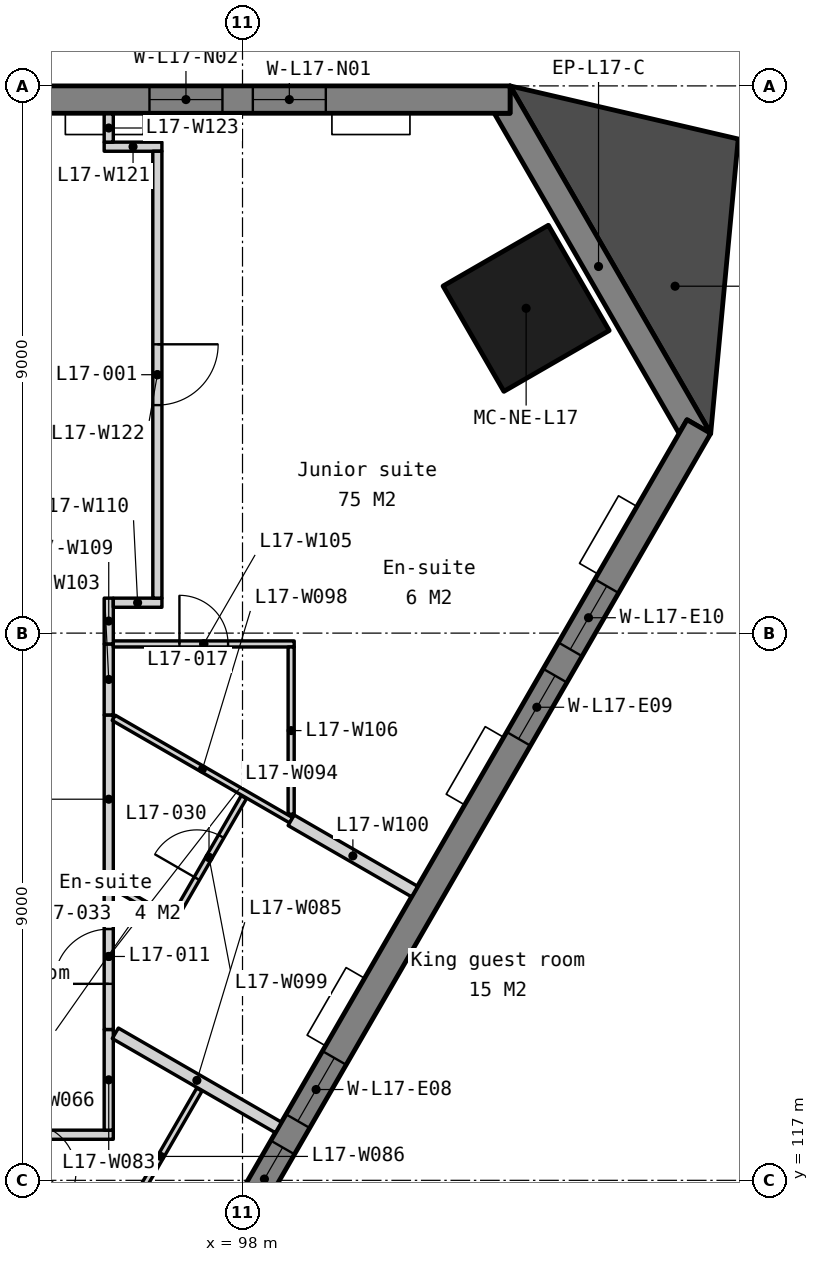
"""IFC4 building model, lengths in metres.
Left out: names, types, materials, properties, quantities, classifications, styles, units other than length and angle.
Written with IfcOpenShell. Run it as: python <this file> out.ifc"""

import sys

from ifc_helpers import new_model, si_unit, direction, frame, frame_2d, origin, origin_2d, place, context, subcontext, project, spatial, polyline, rectangle, outline, extrude, element, fill, save


model = new_model("IFC4")
c1 = context("Model", 3, precision=1e-05, world=origin(), true_north=direction((0.0, 1.0)))
c2 = subcontext(c1, "Body", "Model", "MODEL_VIEW")
j1 = project(units=[si_unit("LENGTHUNIT", "METRE"), si_unit("PLANEANGLEUNIT", "RADIAN")], contexts=[c1])
p1 = place(None, origin())
s1 = spatial("IfcSite", under=j1, at=p1, CompositionType="ELEMENT")
p2 = place(p1, origin())
s2 = spatial("IfcBuilding", under=s1, at=p2, CompositionType="ELEMENT")
p3 = place(p2, frame((0.0, 0.0, 73.5)))
s3 = spatial("IfcBuildingStorey", under=s2, at=p3, CompositionType="ELEMENT", Elevation=73.5)
p4 = place(p3, frame((102.664, 131.342, 0.0), z_axis=(0.0, 0.0, 1.0), x_axis=(-0.5, 0.866025403784, 0.0)))
e1 = element("IfcColumn", 1, at=p4, inside=s3, PredefinedType="COLUMN", context=c2, shape_type="SweptSolid", body=[
    extrude(rectangle(XDim=2.0, YDim=2.0, at=origin_2d()), origin(), (0.0, 0.0, 1.0), 3.5),
])
p5 = place(p3, frame((0.0, 0.0, -0.15)))
e2 = element("IfcWall", 2, at=p5, inside=s3, PredefinedType="SOLIDWALL", context=c2, shape_type="SweptSolid", body=[
    extrude(outline(polyline([(105.7, 129.284), (105.31, 129.509), (105.18, 129.284), (102.14, 134.55), (102.4, 134.55), (102.4, 135.0), (105.7, 129.284)])), origin(), (0.0, 0.0, 1.0), 3.4),
])
p6 = place(p3, frame((102.4, 134.775, -0.15), z_axis=(0.0, 0.0, 1.0), x_axis=(-1.0, 0.0, 0.0)))
e3 = element("IfcWall", 3, at=p6, inside=s3, PredefinedType="SOLIDWALL", context=c2, shape_type="SweptSolid", body=[
    extrude(outline(polyline([(44.8, 0.0), (44.8, 3.4), (0.0, 3.4), (0.0, 0.0), (44.8, 0.0)])), frame((0.0, 0.225, 0.0), z_axis=(0.0, -1.0, 0.0), x_axis=(1.0, 0.0, 0.0)), (0.0, 0.0, 1.0), 0.45),
])
p7 = place(p6, frame((3.03, 0.0, 1.05)))
e4 = element("IfcOpeningElement", 4, at=p7, cuts=e3, PredefinedType="OPENING", context=c2, shape_type="SweptSolid", body=[
    extrude(rectangle(XDim=1.2, YDim=1.5, at=frame_2d((0.6, 0.75))), frame((0.0, 0.235, 0.0), z_axis=(0.0, -1.0, 0.0), x_axis=(1.0, 0.0, 0.0)), (0.0, 0.0, 1.0), 0.47),
])
p8 = place(p6, frame((4.73, 0.0, 1.05)))
e5 = element("IfcOpeningElement", 5, at=p8, cuts=e3, PredefinedType="OPENING", context=c2, shape_type="SweptSolid", body=[
    extrude(rectangle(XDim=1.2, YDim=1.5, at=frame_2d((0.6, 0.75))), frame((0.0, 0.235, 0.0), z_axis=(0.0, -1.0, 0.0), x_axis=(1.0, 0.0, 0.0)), (0.0, 0.0, 1.0), 0.47),
])
p9 = place(p6, frame((11.99, 0.0, 1.05)))
e6 = element("IfcOpeningElement", 6, at=p9, cuts=e3, PredefinedType="OPENING", context=c2, shape_type="SweptSolid", body=[
    extrude(rectangle(XDim=1.2, YDim=1.5, at=frame_2d((0.6, 0.75))), frame((0.0, 0.235, 0.0), z_axis=(0.0, -1.0, 0.0), x_axis=(1.0, 0.0, 0.0)), (0.0, 0.0, 1.0), 0.47),
])
p10 = place(p6, frame((13.69, 0.0, 1.05)))
e7 = element("IfcOpeningElement", 7, at=p10, cuts=e3, PredefinedType="OPENING", context=c2, shape_type="SweptSolid", body=[
    extrude(rectangle(XDim=1.2, YDim=1.5, at=frame_2d((0.6, 0.75))), frame((0.0, 0.235, 0.0), z_axis=(0.0, -1.0, 0.0), x_axis=(1.0, 0.0, 0.0)), (0.0, 0.0, 1.0), 0.47),
])
p11 = place(p6, frame((20.95, 0.0, 1.05)))
e8 = element("IfcOpeningElement", 8, at=p11, cuts=e3, PredefinedType="OPENING", context=c2, shape_type="SweptSolid", body=[
    extrude(rectangle(XDim=1.2, YDim=1.5, at=frame_2d((0.6, 0.75))), frame((0.0, 0.235, 0.0), z_axis=(0.0, -1.0, 0.0), x_axis=(1.0, 0.0, 0.0)), (0.0, 0.0, 1.0), 0.47),
])
p12 = place(p6, frame((22.65, 0.0, 1.05)))
e9 = element("IfcOpeningElement", 9, at=p12, cuts=e3, PredefinedType="OPENING", context=c2, shape_type="SweptSolid", body=[
    extrude(rectangle(XDim=1.2, YDim=1.5, at=frame_2d((0.6, 0.75))), frame((0.0, 0.235, 0.0), z_axis=(0.0, -1.0, 0.0), x_axis=(1.0, 0.0, 0.0)), (0.0, 0.0, 1.0), 0.47),
])
p13 = place(p6, frame((29.91, 0.0, 1.05)))
e10 = element("IfcOpeningElement", 10, at=p13, cuts=e3, PredefinedType="OPENING", context=c2, shape_type="SweptSolid", body=[
    extrude(rectangle(XDim=1.2, YDim=1.5, at=frame_2d((0.6, 0.75))), frame((0.0, 0.235, 0.0), z_axis=(0.0, -1.0, 0.0), x_axis=(1.0, 0.0, 0.0)), (0.0, 0.0, 1.0), 0.47),
])
p14 = place(p6, frame((31.61, 0.0, 1.05)))
e11 = element("IfcOpeningElement", 11, at=p14, cuts=e3, PredefinedType="OPENING", context=c2, shape_type="SweptSolid", body=[
    extrude(rectangle(XDim=1.2, YDim=1.5, at=frame_2d((0.6, 0.75))), frame((0.0, 0.235, 0.0), z_axis=(0.0, -1.0, 0.0), x_axis=(1.0, 0.0, 0.0)), (0.0, 0.0, 1.0), 0.47),
])
p15 = place(p6, frame((38.87, 0.0, 1.05)))
e12 = element("IfcOpeningElement", 12, at=p15, cuts=e3, PredefinedType="OPENING", context=c2, shape_type="SweptSolid", body=[
    extrude(rectangle(XDim=1.2, YDim=1.5, at=frame_2d((0.6, 0.75))), frame((0.0, 0.235, 0.0), z_axis=(0.0, -1.0, 0.0), x_axis=(1.0, 0.0, 0.0)), (0.0, 0.0, 1.0), 0.47),
])
p16 = place(p6, frame((40.57, 0.0, 1.05)))
e13 = element("IfcOpeningElement", 13, at=p16, cuts=e3, PredefinedType="OPENING", context=c2, shape_type="SweptSolid", body=[
    extrude(rectangle(XDim=1.2, YDim=1.5, at=frame_2d((0.6, 0.75))), frame((0.0, 0.235, 0.0), z_axis=(0.0, -1.0, 0.0), x_axis=(1.0, 0.0, 0.0)), (0.0, 0.0, 1.0), 0.47),
])
p17 = place(p3, frame((83.105, 90.599, -0.15), z_axis=(0.0, 0.0, 1.0), x_axis=(0.499999201451, 0.866025864826, 0.0)))
e14 = element("IfcWall", 14, at=p17, inside=s3, PredefinedType="SOLIDWALL", context=c2, shape_type="SweptSolid", body=[
    extrude(outline(polyline([(44.8, 0.0), (44.8, 3.4), (0.0, 3.4), (0.0, 0.0), (44.8, 0.0)])), frame((0.0, 0.225, 0.0), z_axis=(0.0, -1.0, 0.0), x_axis=(1.0, 0.0, 0.0)), (0.0, 0.0, 1.0), 0.45),
])
p18 = place(p17, frame((3.03, 0.0, 1.05)))
e15 = element("IfcOpeningElement", 15, at=p18, cuts=e14, PredefinedType="OPENING", context=c2, shape_type="SweptSolid", body=[
    extrude(rectangle(XDim=1.2, YDim=1.5, at=frame_2d((0.6, 0.75))), frame((0.0, 0.235, 0.0), z_axis=(0.0, -1.0, 0.0), x_axis=(1.0, 0.0, 0.0)), (0.0, 0.0, 1.0), 0.47),
])
p19 = place(p17, frame((4.73, 0.0, 1.05)))
e16 = element("IfcOpeningElement", 16, at=p19, cuts=e14, PredefinedType="OPENING", context=c2, shape_type="SweptSolid", body=[
    extrude(rectangle(XDim=1.2, YDim=1.5, at=frame_2d((0.6, 0.75))), frame((0.0, 0.235, 0.0), z_axis=(0.0, -1.0, 0.0), x_axis=(1.0, 0.0, 0.0)), (0.0, 0.0, 1.0), 0.47),
])
p20 = place(p17, frame((11.99, 0.0, 1.05)))
e17 = element("IfcOpeningElement", 17, at=p20, cuts=e14, PredefinedType="OPENING", context=c2, shape_type="SweptSolid", body=[
    extrude(rectangle(XDim=1.2, YDim=1.5, at=frame_2d((0.6, 0.75))), frame((0.0, 0.235, 0.0), z_axis=(0.0, -1.0, 0.0), x_axis=(1.0, 0.0, 0.0)), (0.0, 0.0, 1.0), 0.47),
])
p21 = place(p17, frame((13.69, 0.0, 1.05)))
e18 = element("IfcOpeningElement", 18, at=p21, cuts=e14, PredefinedType="OPENING", context=c2, shape_type="SweptSolid", body=[
    extrude(rectangle(XDim=1.2, YDim=1.5, at=frame_2d((0.6, 0.75))), frame((0.0, 0.235, 0.0), z_axis=(0.0, -1.0, 0.0), x_axis=(1.0, 0.0, 0.0)), (0.0, 0.0, 1.0), 0.47),
])
p22 = place(p17, frame((20.95, 0.0, 1.05)))
e19 = element("IfcOpeningElement", 19, at=p22, cuts=e14, PredefinedType="OPENING", context=c2, shape_type="SweptSolid", body=[
    extrude(rectangle(XDim=1.2, YDim=1.5, at=frame_2d((0.6, 0.75))), frame((0.0, 0.235, 0.0), z_axis=(0.0, -1.0, 0.0), x_axis=(1.0, 0.0, 0.0)), (0.0, 0.0, 1.0), 0.47),
])
p23 = place(p17, frame((22.65, 0.0, 1.05)))
e20 = element("IfcOpeningElement", 20, at=p23, cuts=e14, PredefinedType="OPENING", context=c2, shape_type="SweptSolid", body=[
    extrude(rectangle(XDim=1.2, YDim=1.5, at=frame_2d((0.6, 0.75))), frame((0.0, 0.235, 0.0), z_axis=(0.0, -1.0, 0.0), x_axis=(1.0, 0.0, 0.0)), (0.0, 0.0, 1.0), 0.47),
])
p24 = place(p17, frame((29.91, 0.0, 1.05)))
e21 = element("IfcOpeningElement", 21, at=p24, cuts=e14, PredefinedType="OPENING", context=c2, shape_type="SweptSolid", body=[
    extrude(rectangle(XDim=1.2, YDim=1.5, at=frame_2d((0.6, 0.75))), frame((0.0, 0.235, 0.0), z_axis=(0.0, -1.0, 0.0), x_axis=(1.0, 0.0, 0.0)), (0.0, 0.0, 1.0), 0.47),
])
p25 = place(p17, frame((31.61, 0.0, 1.05)))
e22 = element("IfcOpeningElement", 22, at=p25, cuts=e14, PredefinedType="OPENING", context=c2, shape_type="SweptSolid", body=[
    extrude(rectangle(XDim=1.2, YDim=1.5, at=frame_2d((0.6, 0.75))), frame((0.0, 0.235, 0.0), z_axis=(0.0, -1.0, 0.0), x_axis=(1.0, 0.0, 0.0)), (0.0, 0.0, 1.0), 0.47),
])
p26 = place(p17, frame((38.87, 0.0, 1.05)))
e23 = element("IfcOpeningElement", 23, at=p26, cuts=e14, PredefinedType="OPENING", context=c2, shape_type="SweptSolid", body=[
    extrude(rectangle(XDim=1.2, YDim=1.5, at=frame_2d((0.6, 0.75))), frame((0.0, 0.235, 0.0), z_axis=(0.0, -1.0, 0.0), x_axis=(1.0, 0.0, 0.0)), (0.0, 0.0, 1.0), 0.47),
])
p27 = place(p17, frame((40.57, 0.0, 1.05)))
e24 = element("IfcOpeningElement", 24, at=p27, cuts=e14, PredefinedType="OPENING", context=c2, shape_type="SweptSolid", body=[
    extrude(rectangle(XDim=1.2, YDim=1.5, at=frame_2d((0.6, 0.75))), frame((0.0, 0.235, 0.0), z_axis=(0.0, -1.0, 0.0), x_axis=(1.0, 0.0, 0.0)), (0.0, 0.0, 1.0), 0.47),
])
p28 = place(p3, frame((0.0, 0.0, -0.15)))
e25 = element("IfcWall", 25, at=p28, inside=s3, PredefinedType="SOLIDWALL", context=c2, shape_type="SweptSolid", body=[
    extrude(outline(polyline([(105.7, 129.284), (106.152, 134.127), (102.4, 135.0), (105.7, 129.284)])), origin(), (0.0, 0.0, 1.0), 3.4),
])
p29 = place(p3, frame((93.575, 117.647, 0.0), z_axis=(0.0, 0.0, 1.0), x_axis=(0.866048401274, -0.499960165064, 0.0)))
e26 = element("IfcWall", 26, at=p29, inside=s3, PredefinedType="PARTITIONING", context=c2, shape_type="SweptSolid", body=[
    extrude(rectangle(XDim=2.845, YDim=0.1, at=frame_2d((1.422, 0.0))), origin(), (0.0, 0.0, 1.0), 3.25),
])
p30 = place(p29, frame((1.022, 0.0, 0.0)))
e27 = element("IfcOpeningElement", 27, at=p30, cuts=e26, PredefinedType="OPENING", context=c2, shape_type="SweptSolid", body=[
    extrude(rectangle(XDim=0.8, YDim=2.1, at=frame_2d((0.4, 1.05))), frame((0.0, 0.06, 0.0), z_axis=(0.0, -1.0, 0.0), x_axis=(1.0, 0.0, 0.0)), (0.0, 0.0, 1.0), 0.12),
])
p31 = place(p3, frame((93.398, 117.75, 0.0), z_axis=(0.0, 0.0, 1.0), x_axis=(1.0, 0.0, 0.0)))
e28 = element("IfcWall", 28, at=p31, inside=s3, PredefinedType="PARTITIONING", context=c2, shape_type="SweptSolid", body=[
    extrude(rectangle(XDim=2.477, YDim=0.15, at=frame_2d((1.239, 0.0))), origin(), (0.0, 0.0, 1.0), 3.25),
])
p32 = place(p3, frame((95.8, 117.825, 0.0), z_axis=(0.0, 0.0, 1.0), x_axis=(0.0, 1.0, 0.0)))
e29 = element("IfcWall", 29, at=p32, inside=s3, PredefinedType="PARTITIONING", context=c2, shape_type="SweptSolid", body=[
    extrude(rectangle(XDim=1.656, YDim=0.15, at=frame_2d((0.828, 0.0))), origin(), (0.0, 0.0, 1.0), 3.25),
])
p33 = place(p3, frame((95.908, 119.418, 0.0), z_axis=(0.0, 0.0, 1.0), x_axis=(0.866051688794, -0.499954470265, 0.0)))
e30 = element("IfcWall", 30, at=p33, inside=s3, PredefinedType="PARTITIONING", context=c2, shape_type="SweptSolid", body=[
    extrude(rectangle(XDim=3.097, YDim=0.2, at=frame_2d((1.548, 0.0))), origin(), (0.0, 0.0, 1.0), 3.25),
])
p34 = place(p3, frame((96.021, 116.293, 0.0), z_axis=(0.0, 0.0, 1.0), x_axis=(0.500005339912, 0.866022320763, 0.0)))
e31 = element("IfcWall", 31, at=p34, inside=s3, PredefinedType="PARTITIONING", context=c2, shape_type="SweptSolid", body=[
    extrude(rectangle(XDim=2.54, YDim=0.1, at=frame_2d((1.27, 0.0))), origin(), (0.0, 0.0, 1.0), 3.25),
])
p35 = place(p3, frame((95.882, 121.835, 0.0), z_axis=(0.0, 0.0, 1.0), x_axis=(0.86601174498, -0.500023656998, 0.0)))
e32 = element("IfcWall", 32, at=p35, inside=s3, PredefinedType="PARTITIONING", context=c2, shape_type="SweptSolid", body=[
    extrude(rectangle(XDim=1.169, YDim=0.1, at=frame_2d((0.585, 0.0))), origin(), (0.0, 0.0, 1.0), 3.25),
])
p36 = place(p3, frame((95.8, 121.883, 0.0), z_axis=(0.0, 0.0, 1.0), x_axis=(0.0, 1.0, 0.0)))
e33 = element("IfcWall", 33, at=p36, inside=s3, PredefinedType="PARTITIONING", context=c2, shape_type="SweptSolid", body=[
    extrude(rectangle(XDim=2.771, YDim=0.15, at=frame_2d((1.386, 0.0))), origin(), (0.0, 0.0, 1.0), 3.25),
])
p37 = place(p3, frame((95.8, 119.481, 0.0), z_axis=(0.0, 0.0, 1.0), x_axis=(0.0, 1.0, 0.0)))
e34 = element("IfcWall", 34, at=p37, inside=s3, PredefinedType="PARTITIONING", context=c2, shape_type="SweptSolid", body=[
    extrude(rectangle(XDim=2.402, YDim=0.15, at=frame_2d((1.201, 0.0))), origin(), (0.0, 0.0, 1.0), 3.25),
])
p38 = place(p37, frame((0.751, 0.0, 0.0)))
e35 = element("IfcOpeningElement", 35, at=p38, cuts=e34, PredefinedType="OPENING", context=c2, shape_type="SweptSolid", body=[
    extrude(rectangle(XDim=0.9, YDim=2.1, at=frame_2d((0.45, 1.05))), frame((0.0, 0.085, 0.0), z_axis=(0.0, -1.0, 0.0), x_axis=(1.0, 0.0, 0.0)), (0.0, 0.0, 1.0), 0.17),
])
p39 = place(p3, frame((95.882, 124.606, 0.0), z_axis=(0.0, 0.0, 1.0), x_axis=(0.866022675988, -0.500004724652, 0.0)))
e36 = element("IfcWall", 36, at=p39, inside=s3, PredefinedType="PARTITIONING", context=c2, shape_type="SweptSolid", body=[
    extrude(rectangle(XDim=3.369, YDim=0.1, at=frame_2d((1.685, 0.0))), origin(), (0.0, 0.0, 1.0), 3.25),
])
p40 = place(p3, frame((96.877, 121.319, 0.0), z_axis=(0.0, 0.0, 1.0), x_axis=(0.499968531483, 0.866043571379, 0.0)))
e37 = element("IfcWall", 37, at=p40, inside=s3, PredefinedType="PARTITIONING", context=c2, shape_type="SweptSolid", body=[
    extrude(rectangle(XDim=2.29, YDim=0.1, at=frame_2d((1.145, 0.0))), origin(), (0.0, 0.0, 1.0), 3.25),
])
p41 = place(p40, frame((0.745, 0.0, 0.0)))
e38 = element("IfcOpeningElement", 38, at=p41, cuts=e37, PredefinedType="OPENING", context=c2, shape_type="SweptSolid", body=[
    extrude(rectangle(XDim=0.8, YDim=2.1, at=frame_2d((0.4, 1.05))), frame((0.0, 0.06, 0.0), z_axis=(0.0, -1.0, 0.0), x_axis=(1.0, 0.0, 0.0)), (0.0, 0.0, 1.0), 0.12),
])
p42 = place(p3, frame((98.8, 122.922, 0.0), z_axis=(0.0, 0.0, 1.0), x_axis=(0.866036444415, -0.49998087658, 0.0)))
e39 = element("IfcWall", 39, at=p42, inside=s3, PredefinedType="PARTITIONING", context=c2, shape_type="SweptSolid", body=[
    extrude(rectangle(XDim=2.344, YDim=0.2, at=frame_2d((1.172, 0.0))), origin(), (0.0, 0.0, 1.0), 3.25),
])
p43 = place(p3, frame((95.8, 124.654, 0.0), z_axis=(0.0, 0.0, 1.0), x_axis=(0.0, 1.0, 0.0)))
e40 = element("IfcWall", 40, at=p43, inside=s3, PredefinedType="PARTITIONING", context=c2, shape_type="SweptSolid", body=[
    extrude(rectangle(XDim=1.168, YDim=0.15, at=frame_2d((0.584, 0.0))), origin(), (0.0, 0.0, 1.0), 3.25),
])
p44 = place(p3, frame((95.875, 125.822, 0.0), z_axis=(0.0, 0.0, 1.0), x_axis=(1.0, 0.0, 0.0)))
e41 = element("IfcWall", 41, at=p44, inside=s3, PredefinedType="PARTITIONING", context=c2, shape_type="SweptSolid", body=[
    extrude(rectangle(XDim=2.975, YDim=0.1, at=frame_2d((1.488, 0.0))), origin(), (0.0, 0.0, 1.0), 3.25),
])
p45 = place(p44, frame((1.087, 0.0, 0.0)))
e42 = element("IfcOpeningElement", 42, at=p45, cuts=e41, PredefinedType="OPENING", context=c2, shape_type="SweptSolid", body=[
    extrude(rectangle(XDim=0.8, YDim=2.1, at=frame_2d((0.4, 1.05))), frame((0.0, 0.06, 0.0), z_axis=(0.0, -1.0, 0.0), x_axis=(1.0, 0.0, 0.0)), (0.0, 0.0, 1.0), 0.12),
])
p46 = place(p3, frame((98.8, 123.022, 0.0), z_axis=(0.0, 0.0, 1.0), x_axis=(0.0, 1.0, 0.0)))
e43 = element("IfcWall", 43, at=p46, inside=s3, PredefinedType="PARTITIONING", context=c2, shape_type="SweptSolid", body=[
    extrude(rectangle(XDim=2.75, YDim=0.1, at=frame_2d((1.375, 0.0))), origin(), (0.0, 0.0, 1.0), 3.25),
])
p47 = place(p3, frame((95.8, 125.822, 0.0), z_axis=(0.0, 0.0, 1.0), x_axis=(0.0, 1.0, 0.0)))
e44 = element("IfcWall", 44, at=p47, inside=s3, PredefinedType="PARTITIONING", context=c2, shape_type="SweptSolid", body=[
    extrude(rectangle(XDim=0.753, YDim=0.15, at=frame_2d((0.376, 0.0))), origin(), (0.0, 0.0, 1.0), 3.25),
])
p48 = place(p3, frame((95.875, 126.5, 0.0), z_axis=(0.0, 0.0, 1.0), x_axis=(1.0, 0.0, 0.0)))
e45 = element("IfcWall", 45, at=p48, inside=s3, PredefinedType="PARTITIONING", context=c2, shape_type="SweptSolid", body=[
    extrude(rectangle(XDim=0.8, YDim=0.15, at=frame_2d((0.4, 0.0))), origin(), (0.0, 0.0, 1.0), 3.25),
])
p49 = place(p3, frame((95.725, 134.0, 0.0), z_axis=(0.0, 0.0, 1.0), x_axis=(1.0, 0.0, 0.0)))
e46 = element("IfcWall", 46, at=p49, inside=s3, PredefinedType="PARTITIONING", context=c2, shape_type="SweptSolid", body=[
    extrude(rectangle(XDim=0.949, YDim=0.15, at=frame_2d((0.475, 0.0))), origin(), (0.0, 0.0, 1.0), 3.25),
])
p50 = place(p3, frame((96.6, 133.925, 0.0), z_axis=(0.0, 0.0, 1.0), x_axis=(6.643194e-05, -0.999999997793, 0.0)))
e47 = element("IfcWall", 47, at=p50, inside=s3, PredefinedType="PARTITIONING", context=c2, shape_type="SweptSolid", body=[
    extrude(rectangle(XDim=7.35, YDim=0.15, at=frame_2d((3.675, 0.0))), origin(), (0.0, 0.0, 1.0), 3.25),
])
p51 = place(p50, frame((3.175, 0.0, 0.0)))
e48 = element("IfcOpeningElement", 48, at=p51, cuts=e47, PredefinedType="OPENING", context=c2, shape_type="SweptSolid", body=[
    extrude(rectangle(XDim=1.0, YDim=2.1, at=frame_2d((0.5, 1.05))), frame((0.0, 0.085, 0.0), z_axis=(0.0, -1.0, 0.0), x_axis=(1.0, 0.0, 0.0)), (0.0, 0.0, 1.0), 0.17),
])
p52 = place(p3, frame((95.8, 134.075, 0.0), z_axis=(0.0, 0.0, 1.0), x_axis=(0.0, 1.0, 0.0)))
e49 = element("IfcWall", 49, at=p52, inside=s3, PredefinedType="PARTITIONING", context=c2, shape_type="SweptSolid", body=[
    extrude(rectangle(XDim=0.465, YDim=0.15, at=frame_2d((0.232, 0.0))), origin(), (0.0, 0.0, 1.0), 3.25),
])
p53 = place(p7, origin())
e50 = element("IfcWindow", 50, at=p53, inside=s3, PartitioningType="SINGLE_PANEL", PredefinedType="WINDOW", context=c2, shape_type="SweptSolid", body=[
    extrude(rectangle(XDim=1.2, YDim=1.5, at=frame_2d((0.6, 0.75))), frame((0.0, 0.03, 0.0), z_axis=(0.0, -1.0, 0.0), x_axis=(1.0, 0.0, 0.0)), (0.0, 0.0, 1.0), 0.06),
])
fill(e4, e50)
p54 = place(p8, origin())
e51 = element("IfcWindow", 51, at=p54, inside=s3, PartitioningType="SINGLE_PANEL", PredefinedType="WINDOW", context=c2, shape_type="SweptSolid", body=[
    extrude(rectangle(XDim=1.2, YDim=1.5, at=frame_2d((0.6, 0.75))), frame((0.0, 0.03, 0.0), z_axis=(0.0, -1.0, 0.0), x_axis=(1.0, 0.0, 0.0)), (0.0, 0.0, 1.0), 0.06),
])
fill(e5, e51)
p55 = place(p24, origin())
e52 = element("IfcWindow", 52, at=p55, inside=s3, PartitioningType="SINGLE_PANEL", PredefinedType="WINDOW", context=c2, shape_type="SweptSolid", body=[
    extrude(rectangle(XDim=1.2, YDim=1.5, at=frame_2d((0.6, 0.75))), frame((0.0, 0.03, 0.0), z_axis=(0.0, -1.0, 0.0), x_axis=(1.0, 0.0, 0.0)), (0.0, 0.0, 1.0), 0.06),
])
fill(e21, e52)
p56 = place(p25, origin())
e53 = element("IfcWindow", 53, at=p56, inside=s3, PartitioningType="SINGLE_PANEL", PredefinedType="WINDOW", context=c2, shape_type="SweptSolid", body=[
    extrude(rectangle(XDim=1.2, YDim=1.5, at=frame_2d((0.6, 0.75))), frame((0.0, 0.03, 0.0), z_axis=(0.0, -1.0, 0.0), x_axis=(1.0, 0.0, 0.0)), (0.0, 0.0, 1.0), 0.06),
])
fill(e22, e53)
p57 = place(p26, origin())
e54 = element("IfcWindow", 54, at=p57, inside=s3, PartitioningType="SINGLE_PANEL", PredefinedType="WINDOW", context=c2, shape_type="SweptSolid", body=[
    extrude(rectangle(XDim=1.2, YDim=1.5, at=frame_2d((0.6, 0.75))), frame((0.0, 0.03, 0.0), z_axis=(0.0, -1.0, 0.0), x_axis=(1.0, 0.0, 0.0)), (0.0, 0.0, 1.0), 0.06),
])
fill(e23, e54)
p58 = place(p27, origin())
e55 = element("IfcWindow", 55, at=p58, inside=s3, PartitioningType="SINGLE_PANEL", PredefinedType="WINDOW", context=c2, shape_type="SweptSolid", body=[
    extrude(rectangle(XDim=1.2, YDim=1.5, at=frame_2d((0.6, 0.75))), frame((0.0, 0.03, 0.0), z_axis=(0.0, -1.0, 0.0), x_axis=(1.0, 0.0, 0.0)), (0.0, 0.0, 1.0), 0.06),
])
fill(e24, e55)
p59 = place(p51, origin())
e56 = element("IfcDoor", 56, at=p59, inside=s3, OperationType="SINGLE_SWING_LEFT", PredefinedType="DOOR", context=c2, shape_type="SweptSolid", body=[
    extrude(rectangle(XDim=1.0, YDim=2.1, at=frame_2d((0.5, 1.05))), frame((0.0, 0.025, 0.0), z_axis=(0.0, -1.0, 0.0), x_axis=(1.0, 0.0, 0.0)), (0.0, 0.0, 1.0), 0.05),
])
fill(e48, e56)
p60 = place(p38, origin())
e57 = element("IfcDoor", 57, at=p60, inside=s3, OperationType="SINGLE_SWING_LEFT", PredefinedType="DOOR", context=c2, shape_type="SweptSolid", body=[
    extrude(rectangle(XDim=0.9, YDim=2.1, at=frame_2d((0.45, 1.05))), frame((0.0, 0.025, 0.0), z_axis=(0.0, -1.0, 0.0), x_axis=(1.0, 0.0, 0.0)), (0.0, 0.0, 1.0), 0.05),
])
fill(e35, e57)
p61 = place(p45, origin())
e58 = element("IfcDoor", 58, at=p61, inside=s3, OperationType="SINGLE_SWING_LEFT", PredefinedType="DOOR", context=c2, shape_type="SweptSolid", body=[
    extrude(rectangle(XDim=0.8, YDim=2.1, at=frame_2d((0.4, 1.05))), frame((0.0, 0.025, 0.0), z_axis=(0.0, -1.0, 0.0), x_axis=(1.0, 0.0, 0.0)), (0.0, 0.0, 1.0), 0.05),
])
fill(e42, e58)
p62 = place(p30, origin())
e59 = element("IfcDoor", 59, at=p62, inside=s3, OperationType="SINGLE_SWING_LEFT", PredefinedType="DOOR", context=c2, shape_type="SweptSolid", body=[
    extrude(rectangle(XDim=0.8, YDim=2.1, at=frame_2d((0.4, 1.05))), frame((0.0, 0.025, 0.0), z_axis=(0.0, -1.0, 0.0), x_axis=(1.0, 0.0, 0.0)), (0.0, 0.0, 1.0), 0.05),
])
fill(e27, e59)
p63 = place(p41, origin())
e60 = element("IfcDoor", 60, at=p63, inside=s3, OperationType="SINGLE_SWING_LEFT", PredefinedType="DOOR", context=c2, shape_type="SweptSolid", body=[
    extrude(rectangle(XDim=0.8, YDim=2.1, at=frame_2d((0.4, 1.05))), frame((0.0, 0.025, 0.0), z_axis=(0.0, -1.0, 0.0), x_axis=(1.0, 0.0, 0.0)), (0.0, 0.0, 1.0), 0.05),
])
fill(e38, e60)
save(model, sys.argv[1])
